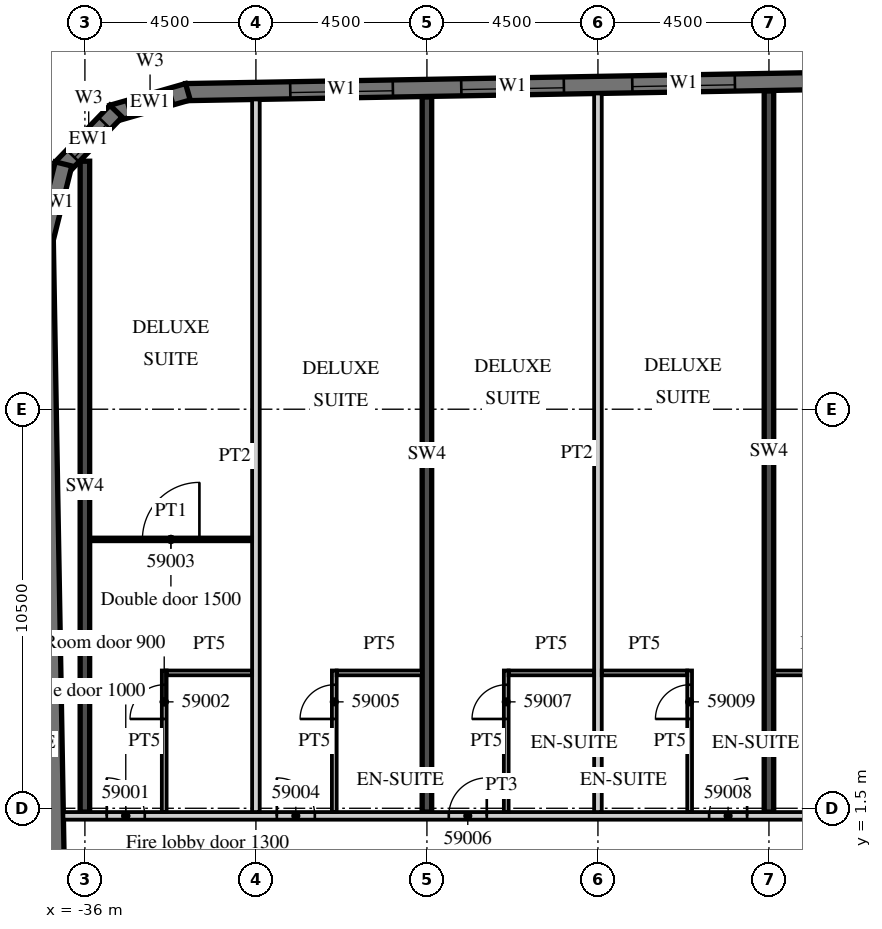
"""IFC4 building model, lengths in metres.
Left out: names, types, materials, properties, quantities, classifications, styles, units other than length and angle.
Written with IfcOpenShell. Run it as: python <this file> out.ifc"""

import sys

from ifc_helpers import new_model, si_unit, direction, frame, frame_2d, origin, place, context, subcontext, project, spatial, polyline, rectangle, outline, extrude, element, fill, save


model = new_model("IFC4")
c1 = context("Model", 3, precision=1e-05, world=origin(), true_north=direction((0.0, 1.0)))
c2 = subcontext(c1, "Body", "Model", "MODEL_VIEW")
j1 = project(units=[si_unit("LENGTHUNIT", "METRE"), si_unit("PLANEANGLEUNIT", "RADIAN")], contexts=[c1])
p1 = place(None, origin())
s1 = spatial("IfcSite", under=j1, at=p1, CompositionType="ELEMENT")
p2 = place(p1, origin())
s2 = spatial("IfcBuilding", under=s1, at=p2, CompositionType="ELEMENT")
p3 = place(p2, frame((0.0, 0.0, 240.8)))
s3 = spatial("IfcBuildingStorey", under=s2, at=p3, CompositionType="ELEMENT", Elevation=240.8)
p4 = place(p3, frame((-36.0, 1.4, 0.0), z_axis=(0.0, 0.0, 1.0), x_axis=(0.0, 1.0, 0.0)))
e1 = element("IfcWall", 1, at=p4, inside=s3, PredefinedType="SHEAR", context=c2, shape_type="SweptSolid", body=[
    extrude(rectangle(XDim=17.125, YDim=0.25, at=frame_2d((8.563, 0.0))), origin(), (0.0, 0.0, 1.0), 3.3),
])
p5 = place(p3, frame((-27.0, 1.4, 0.0), z_axis=(0.0, 0.0, 1.0), x_axis=(0.0, 1.0, 0.0)))
e2 = element("IfcWall", 2, at=p5, inside=s3, PredefinedType="SHEAR", context=c2, shape_type="SweptSolid", body=[
    extrude(rectangle(XDim=18.817, YDim=0.25, at=frame_2d((9.409, 0.0))), origin(), (0.0, 0.0, 1.0), 3.3),
])
p6 = place(p3, frame((-18.0, 1.4, 0.0), z_axis=(0.0, 0.0, 1.0), x_axis=(0.0, 1.0, 0.0)))
e3 = element("IfcWall", 3, at=p6, inside=s3, PredefinedType="SHEAR", context=c2, shape_type="SweptSolid", body=[
    extrude(rectangle(XDim=18.974, YDim=0.25, at=frame_2d((9.487, 0.0))), origin(), (0.0, 0.0, 1.0), 3.3),
])
p7 = place(p3, frame((-37.057, 16.503, 0.0), z_axis=(0.0, 0.0, 1.0), x_axis=(0.017452279857, -0.999847697366, 0.0)))
e4 = element("IfcWall", 4, at=p7, inside=s3, PredefinedType="SOLIDWALL", context=c2, shape_type="SweptSolid", body=[
    extrude(rectangle(XDim=33.0, YDim=0.45, at=frame_2d((16.5, 0.0))), origin(), (0.0, 0.0, 1.0), 3.02),
])
p8 = place(p3, frame((13.504, 21.161, 0.0), z_axis=(0.0, 0.0, 1.0), x_axis=(-0.999847763257, -0.017448504532, 0.0)))
e5 = element("IfcWall", 5, at=p8, inside=s3, PredefinedType="SOLIDWALL", context=c2, shape_type="SweptSolid", body=[
    extrude(rectangle(XDim=46.859, YDim=0.45, at=frame_2d((23.43, 0.0))), origin(), (0.0, 0.0, 1.0), 3.02),
])
p9 = place(p8, frame((0.9, 0.0, 0.45)))
e6 = element("IfcOpeningElement", 6, at=p9, cuts=e5, PredefinedType="OPENING", context=c2, shape_type="SweptSolid", body=[
    extrude(rectangle(XDim=2.7, YDim=2.25, at=frame_2d((1.35, 1.125))), frame((0.0, 0.235, 0.0), z_axis=(0.0, -1.0, 0.0), x_axis=(1.0, 0.0, 0.0)), (0.0, 0.0, 1.0), 0.47),
])
p10 = place(p8, frame((5.401, 0.0, 0.45)))
e7 = element("IfcOpeningElement", 7, at=p10, cuts=e5, PredefinedType="OPENING", context=c2, shape_type="SweptSolid", body=[
    extrude(rectangle(XDim=2.7, YDim=2.25, at=frame_2d((1.35, 1.125))), frame((0.0, 0.235, 0.0), z_axis=(0.0, -1.0, 0.0), x_axis=(1.0, 0.0, 0.0)), (0.0, 0.0, 1.0), 0.47),
])
p11 = place(p8, frame((9.902, 0.0, 0.45)))
e8 = element("IfcOpeningElement", 8, at=p11, cuts=e5, PredefinedType="OPENING", context=c2, shape_type="SweptSolid", body=[
    extrude(rectangle(XDim=2.7, YDim=2.25, at=frame_2d((1.35, 1.125))), frame((0.0, 0.235, 0.0), z_axis=(0.0, -1.0, 0.0), x_axis=(1.0, 0.0, 0.0)), (0.0, 0.0, 1.0), 0.47),
])
p12 = place(p8, frame((14.402, 0.0, 0.45)))
e9 = element("IfcOpeningElement", 9, at=p12, cuts=e5, PredefinedType="OPENING", context=c2, shape_type="SweptSolid", body=[
    extrude(rectangle(XDim=2.7, YDim=2.25, at=frame_2d((1.35, 1.125))), frame((0.0, 0.235, 0.0), z_axis=(0.0, -1.0, 0.0), x_axis=(1.0, 0.0, 0.0)), (0.0, 0.0, 1.0), 0.47),
])
p13 = place(p8, frame((18.903, 0.0, 0.45)))
e10 = element("IfcOpeningElement", 10, at=p13, cuts=e5, PredefinedType="OPENING", context=c2, shape_type="SweptSolid", body=[
    extrude(rectangle(XDim=2.7, YDim=2.25, at=frame_2d((1.35, 1.125))), frame((0.0, 0.235, 0.0), z_axis=(0.0, -1.0, 0.0), x_axis=(1.0, 0.0, 0.0)), (0.0, 0.0, 1.0), 0.47),
])
p14 = place(p8, frame((23.404, 0.0, 0.45)))
e11 = element("IfcOpeningElement", 11, at=p14, cuts=e5, PredefinedType="OPENING", context=c2, shape_type="SweptSolid", body=[
    extrude(rectangle(XDim=2.7, YDim=2.25, at=frame_2d((1.35, 1.125))), frame((0.0, 0.235, 0.0), z_axis=(0.0, -1.0, 0.0), x_axis=(1.0, 0.0, 0.0)), (0.0, 0.0, 1.0), 0.47),
])
p15 = place(p8, frame((27.904, 0.0, 0.45)))
e12 = element("IfcOpeningElement", 12, at=p15, cuts=e5, PredefinedType="OPENING", context=c2, shape_type="SweptSolid", body=[
    extrude(rectangle(XDim=2.7, YDim=2.25, at=frame_2d((1.35, 1.125))), frame((0.0, 0.235, 0.0), z_axis=(0.0, -1.0, 0.0), x_axis=(1.0, 0.0, 0.0)), (0.0, 0.0, 1.0), 0.47),
])
p16 = place(p8, frame((32.405, 0.0, 0.45)))
e13 = element("IfcOpeningElement", 13, at=p16, cuts=e5, PredefinedType="OPENING", context=c2, shape_type="SweptSolid", body=[
    extrude(rectangle(XDim=2.7, YDim=2.25, at=frame_2d((1.35, 1.125))), frame((0.0, 0.235, 0.0), z_axis=(0.0, -1.0, 0.0), x_axis=(1.0, 0.0, 0.0)), (0.0, 0.0, 1.0), 0.47),
])
p17 = place(p8, frame((36.906, 0.0, 0.45)))
e14 = element("IfcOpeningElement", 14, at=p17, cuts=e5, PredefinedType="OPENING", context=c2, shape_type="SweptSolid", body=[
    extrude(rectangle(XDim=2.7, YDim=2.25, at=frame_2d((1.35, 1.125))), frame((0.0, 0.235, 0.0), z_axis=(0.0, -1.0, 0.0), x_axis=(1.0, 0.0, 0.0)), (0.0, 0.0, 1.0), 0.47),
])
p18 = place(p8, frame((41.406, 0.0, 0.45)))
e15 = element("IfcOpeningElement", 15, at=p18, cuts=e5, PredefinedType="OPENING", context=c2, shape_type="SweptSolid", body=[
    extrude(rectangle(XDim=2.7, YDim=2.25, at=frame_2d((1.35, 1.125))), frame((0.0, 0.235, 0.0), z_axis=(0.0, -1.0, 0.0), x_axis=(1.0, 0.0, 0.0)), (0.0, 0.0, 1.0), 0.47),
])
p19 = place(p3, frame((-33.29, 20.352, 0.0), z_axis=(0.0, 0.0, 1.0), x_axis=(-0.961247584925, -0.275686562016, 0.0)))
e16 = element("IfcWall", 16, at=p19, inside=s3, PredefinedType="SOLIDWALL", context=c2, shape_type="SweptSolid", body=[
    extrude(outline(polyline([(0.0, -0.225), (2.071, -0.225), (1.95, 0.225), (0.121, 0.225), (0.0, -0.225)])), origin(), (0.0, 0.0, 1.0), 3.02),
])
p20 = place(p19, frame((0.435, 0.0, 0.45)))
e17 = element("IfcOpeningElement", 17, at=p20, cuts=e16, PredefinedType="OPENING", context=c2, shape_type="SweptSolid", body=[
    extrude(rectangle(XDim=1.2, YDim=2.25, at=frame_2d((0.6, 1.125))), frame((0.0, 0.235, 0.0), z_axis=(0.0, -1.0, 0.0), x_axis=(1.0, 0.0, 0.0)), (0.0, 0.0, 1.0), 0.47),
])
p21 = place(p3, frame((-35.181, 19.842, 0.0), z_axis=(0.0, 0.0, 1.0), x_axis=(-0.694678672846, -0.719320193998, 0.0)))
e18 = element("IfcWall", 18, at=p21, inside=s3, PredefinedType="SOLIDWALL", context=c2, shape_type="SweptSolid", body=[
    extrude(outline(polyline([(0.0, -0.225), (2.071, -0.225), (1.95, 0.225), (0.121, 0.225), (0.0, -0.225)])), origin(), (0.0, 0.0, 1.0), 3.02),
])
p22 = place(p21, frame((0.435, 0.0, 0.45)))
e19 = element("IfcOpeningElement", 19, at=p22, cuts=e18, PredefinedType="OPENING", context=c2, shape_type="SweptSolid", body=[
    extrude(rectangle(XDim=1.2, YDim=2.25, at=frame_2d((0.6, 1.125))), frame((0.0, 0.235, 0.0), z_axis=(0.0, -1.0, 0.0), x_axis=(1.0, 0.0, 0.0)), (0.0, 0.0, 1.0), 0.47),
])
p23 = place(p3, frame((-36.563, 18.454, 0.0), z_axis=(0.0, 0.0, 1.0), x_axis=(-0.241869623482, -0.970308757683, 0.0)))
e20 = element("IfcWall", 20, at=p23, inside=s3, PredefinedType="SOLIDWALL", context=c2, shape_type="SweptSolid", body=[
    extrude(outline(polyline([(-0.0, -0.225), (2.07, -0.225), (1.95, 0.225), (0.12, 0.225), (-0.0, -0.225)])), origin(), (0.0, 0.0, 1.0), 3.02),
])
p24 = place(p3, frame((-36.566, 1.3, 0.0), z_axis=(0.0, 0.0, 1.0), x_axis=(1.0, 0.0, 0.0)))
e21 = element("IfcWall", 21, at=p24, inside=s3, PredefinedType="PARTITIONING", context=c2, shape_type="SweptSolid", body=[
    extrude(rectangle(XDim=23.066, YDim=0.2, at=frame_2d((11.533, 0.0))), origin(), (0.0, 0.0, 1.0), 3.02),
])
p25 = place(p24, frame((1.141, 0.0, 0.0)))
e22 = element("IfcOpeningElement", 22, at=p25, cuts=e21, PredefinedType="OPENING", context=c2, shape_type="SweptSolid", body=[
    extrude(rectangle(XDim=1.0, YDim=2.1, at=frame_2d((0.5, 1.05))), frame((0.0, 0.11, 0.0), z_axis=(0.0, -1.0, 0.0), x_axis=(1.0, 0.0, 0.0)), (0.0, 0.0, 1.0), 0.22),
])
p26 = place(p24, frame((5.616, 0.0, 0.0)))
e23 = element("IfcOpeningElement", 23, at=p26, cuts=e21, PredefinedType="OPENING", context=c2, shape_type="SweptSolid", body=[
    extrude(rectangle(XDim=1.0, YDim=2.1, at=frame_2d((0.5, 1.05))), frame((0.0, 0.11, 0.0), z_axis=(0.0, -1.0, 0.0), x_axis=(1.0, 0.0, 0.0)), (0.0, 0.0, 1.0), 0.22),
])
p27 = place(p24, frame((10.141, 0.0, 0.0)))
e24 = element("IfcOpeningElement", 24, at=p27, cuts=e21, PredefinedType="OPENING", context=c2, shape_type="SweptSolid", body=[
    extrude(rectangle(XDim=1.0, YDim=2.1, at=frame_2d((0.5, 1.05))), frame((0.0, 0.11, 0.0), z_axis=(0.0, -1.0, 0.0), x_axis=(1.0, 0.0, 0.0)), (0.0, 0.0, 1.0), 0.22),
])
p28 = place(p24, frame((16.991, 0.0, 0.0)))
e25 = element("IfcOpeningElement", 25, at=p28, cuts=e21, PredefinedType="OPENING", context=c2, shape_type="SweptSolid", body=[
    extrude(rectangle(XDim=1.0, YDim=2.1, at=frame_2d((0.5, 1.05))), frame((0.0, 0.11, 0.0), z_axis=(0.0, -1.0, 0.0), x_axis=(1.0, 0.0, 0.0)), (0.0, 0.0, 1.0), 0.22),
])
p29 = place(p24, frame((21.491, 0.0, 0.0)))
e26 = element("IfcOpeningElement", 26, at=p29, cuts=e21, PredefinedType="OPENING", context=c2, shape_type="SweptSolid", body=[
    extrude(rectangle(XDim=1.0, YDim=2.1, at=frame_2d((0.5, 1.05))), frame((0.0, 0.11, 0.0), z_axis=(0.0, -1.0, 0.0), x_axis=(1.0, 0.0, 0.0)), (0.0, 0.0, 1.0), 0.22),
])
p30 = place(p3, frame((-31.5, 1.4, 0.0), z_axis=(0.0, 0.0, 1.0), x_axis=(0.0, 1.0, 0.0)))
e27 = element("IfcWall", 27, at=p30, inside=s3, PredefinedType="PARTITIONING", context=c2, shape_type="SweptSolid", body=[
    extrude(rectangle(XDim=18.751, YDim=0.2, at=frame_2d((9.375, 0.0))), origin(), (0.0, 0.0, 1.0), 3.02),
])
p31 = place(p3, frame((-33.913, 1.4, 0.0), z_axis=(0.0, 0.0, 1.0), x_axis=(0.0, 1.0, 0.0)))
e28 = element("IfcWall", 28, at=p31, inside=s3, PredefinedType="PARTITIONING", context=c2, shape_type="SweptSolid", body=[
    extrude(rectangle(XDim=3.725, YDim=0.125, at=frame_2d((1.863, 0.0))), origin(), (0.0, 0.0, 1.0), 3.02),
])
p32 = place(p31, frame((2.45, 0.0, 0.0)))
e29 = element("IfcOpeningElement", 29, at=p32, cuts=e28, PredefinedType="OPENING", context=c2, shape_type="SweptSolid", body=[
    extrude(rectangle(XDim=0.9, YDim=2.1, at=frame_2d((0.45, 1.05))), frame((0.0, 0.073, 0.0), z_axis=(0.0, -1.0, 0.0), x_axis=(1.0, 0.0, 0.0)), (0.0, 0.0, 1.0), 0.145),
])
p33 = place(p3, frame((-33.85, 5.062, 0.0), z_axis=(0.0, 0.0, 1.0), x_axis=(1.0, 0.0, 0.0)))
e30 = element("IfcWall", 30, at=p33, inside=s3, PredefinedType="PARTITIONING", context=c2, shape_type="SweptSolid", body=[
    extrude(rectangle(XDim=2.25, YDim=0.125, at=frame_2d((1.125, 0.0))), origin(), (0.0, 0.0, 1.0), 3.02),
])
p34 = place(p3, frame((-35.875, 8.575, 0.0), z_axis=(0.0, 0.0, 1.0), x_axis=(1.0, 0.0, 0.0)))
e31 = element("IfcWall", 31, at=p34, inside=s3, PredefinedType="PARTITIONING", context=c2, shape_type="SweptSolid", body=[
    extrude(rectangle(XDim=4.275, YDim=0.1, at=frame_2d((2.137, 0.0))), origin(), (0.0, 0.0, 1.0), 3.02),
])
p35 = place(p34, frame((1.388, 0.0, 0.0)))
e32 = element("IfcOpeningElement", 32, at=p35, cuts=e31, PredefinedType="OPENING", context=c2, shape_type="SweptSolid", body=[
    extrude(rectangle(XDim=1.5, YDim=2.1, at=frame_2d((0.75, 1.05))), frame((0.0, 0.06, 0.0), z_axis=(0.0, -1.0, 0.0), x_axis=(1.0, 0.0, 0.0)), (0.0, 0.0, 1.0), 0.12),
])
p36 = place(p3, frame((-29.438, 1.4, 0.0), z_axis=(0.0, 0.0, 1.0), x_axis=(0.0, 1.0, 0.0)))
e33 = element("IfcWall", 33, at=p36, inside=s3, PredefinedType="PARTITIONING", context=c2, shape_type="SweptSolid", body=[
    extrude(rectangle(XDim=3.725, YDim=0.125, at=frame_2d((1.863, 0.0))), origin(), (0.0, 0.0, 1.0), 3.02),
])
p37 = place(p36, frame((2.45, 0.0, 0.0)))
e34 = element("IfcOpeningElement", 34, at=p37, cuts=e33, PredefinedType="OPENING", context=c2, shape_type="SweptSolid", body=[
    extrude(rectangle(XDim=0.9, YDim=2.1, at=frame_2d((0.45, 1.05))), frame((0.0, 0.073, 0.0), z_axis=(0.0, -1.0, 0.0), x_axis=(1.0, 0.0, 0.0)), (0.0, 0.0, 1.0), 0.145),
])
p38 = place(p3, frame((-29.375, 5.062, 0.0), z_axis=(0.0, 0.0, 1.0), x_axis=(1.0, 0.0, 0.0)))
e35 = element("IfcWall", 35, at=p38, inside=s3, PredefinedType="PARTITIONING", context=c2, shape_type="SweptSolid", body=[
    extrude(rectangle(XDim=2.25, YDim=0.125, at=frame_2d((1.125, 0.0))), origin(), (0.0, 0.0, 1.0), 3.02),
])
p39 = place(p3, frame((-22.5, 1.4, 0.0), z_axis=(0.0, 0.0, 1.0), x_axis=(0.0, 1.0, 0.0)))
e36 = element("IfcWall", 36, at=p39, inside=s3, PredefinedType="PARTITIONING", context=c2, shape_type="SweptSolid", body=[
    extrude(rectangle(XDim=18.908, YDim=0.2, at=frame_2d((9.454, 0.0))), origin(), (0.0, 0.0, 1.0), 3.02),
])
p40 = place(p3, frame((-24.913, 1.4, 0.0), z_axis=(0.0, 0.0, 1.0), x_axis=(0.0, 1.0, 0.0)))
e37 = element("IfcWall", 37, at=p40, inside=s3, PredefinedType="PARTITIONING", context=c2, shape_type="SweptSolid", body=[
    extrude(rectangle(XDim=3.725, YDim=0.125, at=frame_2d((1.863, 0.0))), origin(), (0.0, 0.0, 1.0), 3.02),
])
p41 = place(p40, frame((2.45, 0.0, 0.0)))
e38 = element("IfcOpeningElement", 38, at=p41, cuts=e37, PredefinedType="OPENING", context=c2, shape_type="SweptSolid", body=[
    extrude(rectangle(XDim=0.9, YDim=2.1, at=frame_2d((0.45, 1.05))), frame((0.0, 0.073, 0.0), z_axis=(0.0, -1.0, 0.0), x_axis=(1.0, 0.0, 0.0)), (0.0, 0.0, 1.0), 0.145),
])
p42 = place(p3, frame((-24.85, 5.062, 0.0), z_axis=(0.0, 0.0, 1.0), x_axis=(1.0, 0.0, 0.0)))
e39 = element("IfcWall", 39, at=p42, inside=s3, PredefinedType="PARTITIONING", context=c2, shape_type="SweptSolid", body=[
    extrude(rectangle(XDim=2.25, YDim=0.125, at=frame_2d((1.125, 0.0))), origin(), (0.0, 0.0, 1.0), 3.02),
])
p43 = place(p3, frame((-20.087, 1.4, 0.0), z_axis=(0.0, 0.0, 1.0), x_axis=(0.0, 1.0, 0.0)))
e40 = element("IfcWall", 40, at=p43, inside=s3, PredefinedType="PARTITIONING", context=c2, shape_type="SweptSolid", body=[
    extrude(rectangle(XDim=3.725, YDim=0.125, at=frame_2d((1.863, 0.0))), origin(), (0.0, 0.0, 1.0), 3.02),
])
p44 = place(p43, frame((2.45, 0.0, 0.0)))
e41 = element("IfcOpeningElement", 41, at=p44, cuts=e40, PredefinedType="OPENING", context=c2, shape_type="SweptSolid", body=[
    extrude(rectangle(XDim=0.9, YDim=2.1, at=frame_2d((0.45, 1.05))), frame((0.0, 0.073, 0.0), z_axis=(0.0, -1.0, 0.0), x_axis=(1.0, 0.0, 0.0)), (0.0, 0.0, 1.0), 0.145),
])
for number, where, z_axis, x_axis in (
    (42, (-22.4, 5.062, 0.0), (0.0, 0.0, 1.0), (1.0, 0.0, 0.0)),
    (43, (-17.875, 5.062, 0.0), (0.0, 0.0, 1.0), (1.0, 0.0, 0.0)),
):
    element("IfcWall", number, at=place(p3, frame(where, z_axis=z_axis, x_axis=x_axis)), inside=s3, PredefinedType="PARTITIONING", context=c2, shape_type="SweptSolid", body=[
        extrude(rectangle(XDim=2.25, YDim=0.125, at=frame_2d((1.125, 0.0))), origin(), (0.0, 0.0, 1.0), 3.02),
    ])
p45 = place(p16, origin())
e44 = element("IfcWindow", 44, at=p45, inside=s3, PartitioningType="SINGLE_PANEL", PredefinedType="WINDOW", context=c2, shape_type="SweptSolid", body=[
    extrude(rectangle(XDim=2.7, YDim=2.25, at=frame_2d((1.35, 1.125))), frame((0.0, 0.09, 0.0), z_axis=(0.0, -1.0, 0.0), x_axis=(1.0, 0.0, 0.0)), (0.0, 0.0, 1.0), 0.06),
])
fill(e13, e44)
p46 = place(p17, origin())
e45 = element("IfcWindow", 45, at=p46, inside=s3, PartitioningType="SINGLE_PANEL", PredefinedType="WINDOW", context=c2, shape_type="SweptSolid", body=[
    extrude(rectangle(XDim=2.7, YDim=2.25, at=frame_2d((1.35, 1.125))), frame((0.0, 0.09, 0.0), z_axis=(0.0, -1.0, 0.0), x_axis=(1.0, 0.0, 0.0)), (0.0, 0.0, 1.0), 0.06),
])
fill(e14, e45)
p47 = place(p18, origin())
e46 = element("IfcWindow", 46, at=p47, inside=s3, PartitioningType="SINGLE_PANEL", PredefinedType="WINDOW", context=c2, shape_type="SweptSolid", body=[
    extrude(rectangle(XDim=2.7, YDim=2.25, at=frame_2d((1.35, 1.125))), frame((0.0, 0.09, 0.0), z_axis=(0.0, -1.0, 0.0), x_axis=(1.0, 0.0, 0.0)), (0.0, 0.0, 1.0), 0.06),
])
fill(e15, e46)
p48 = place(p20, origin())
e47 = element("IfcWindow", 47, at=p48, inside=s3, PartitioningType="SINGLE_PANEL", PredefinedType="WINDOW", context=c2, shape_type="SweptSolid", body=[
    extrude(rectangle(XDim=1.2, YDim=2.25, at=frame_2d((0.6, 1.125))), frame((0.0, 0.09, 0.0), z_axis=(0.0, -1.0, 0.0), x_axis=(1.0, 0.0, 0.0)), (0.0, 0.0, 1.0), 0.06),
])
fill(e17, e47)
p49 = place(p22, origin())
e48 = element("IfcWindow", 48, at=p49, inside=s3, PartitioningType="SINGLE_PANEL", PredefinedType="WINDOW", context=c2, shape_type="SweptSolid", body=[
    extrude(rectangle(XDim=1.2, YDim=2.25, at=frame_2d((0.6, 1.125))), frame((0.0, 0.09, 0.0), z_axis=(0.0, -1.0, 0.0), x_axis=(1.0, 0.0, 0.0)), (0.0, 0.0, 1.0), 0.06),
])
fill(e19, e48)
p50 = place(p25, origin())
e49 = element("IfcDoor", 49, at=p50, inside=s3, OperationType="SINGLE_SWING_LEFT", PredefinedType="DOOR", context=c2, shape_type="SweptSolid", body=[
    extrude(rectangle(XDim=1.0, YDim=2.1, at=frame_2d((0.5, 1.05))), frame((0.0, 0.025, 0.0), z_axis=(0.0, -1.0, 0.0), x_axis=(1.0, 0.0, 0.0)), (0.0, 0.0, 1.0), 0.05),
])
fill(e22, e49)
p51 = place(p32, origin())
e50 = element("IfcDoor", 50, at=p51, inside=s3, OperationType="SINGLE_SWING_LEFT", PredefinedType="DOOR", context=c2, shape_type="SweptSolid", body=[
    extrude(rectangle(XDim=0.9, YDim=2.1, at=frame_2d((0.45, 1.05))), frame((0.0, 0.025, 0.0), z_axis=(0.0, -1.0, 0.0), x_axis=(1.0, 0.0, 0.0)), (0.0, 0.0, 1.0), 0.05),
])
fill(e29, e50)
p52 = place(p35, origin())
e51 = element("IfcDoor", 51, at=p52, inside=s3, OperationType="SINGLE_SWING_RIGHT", PredefinedType="DOOR", context=c2, shape_type="SweptSolid", body=[
    extrude(rectangle(XDim=1.5, YDim=2.1, at=frame_2d((0.75, 1.05))), frame((0.0, 0.025, 0.0), z_axis=(0.0, -1.0, 0.0), x_axis=(1.0, 0.0, 0.0)), (0.0, 0.0, 1.0), 0.05),
])
fill(e32, e51)
p53 = place(p26, origin())
e52 = element("IfcDoor", 52, at=p53, inside=s3, OperationType="SINGLE_SWING_LEFT", PredefinedType="DOOR", context=c2, shape_type="SweptSolid", body=[
    extrude(rectangle(XDim=1.0, YDim=2.1, at=frame_2d((0.5, 1.05))), frame((0.0, 0.025, 0.0), z_axis=(0.0, -1.0, 0.0), x_axis=(1.0, 0.0, 0.0)), (0.0, 0.0, 1.0), 0.05),
])
fill(e23, e52)
p54 = place(p37, origin())
e53 = element("IfcDoor", 53, at=p54, inside=s3, OperationType="SINGLE_SWING_LEFT", PredefinedType="DOOR", context=c2, shape_type="SweptSolid", body=[
    extrude(rectangle(XDim=0.9, YDim=2.1, at=frame_2d((0.45, 1.05))), frame((0.0, 0.025, 0.0), z_axis=(0.0, -1.0, 0.0), x_axis=(1.0, 0.0, 0.0)), (0.0, 0.0, 1.0), 0.05),
])
fill(e34, e53)
p55 = place(p27, origin())
e54 = element("IfcDoor", 54, at=p55, inside=s3, OperationType="SINGLE_SWING_RIGHT", PredefinedType="DOOR", context=c2, shape_type="SweptSolid", body=[
    extrude(rectangle(XDim=1.0, YDim=2.1, at=frame_2d((0.5, 1.05))), frame((0.0, 0.025, 0.0), z_axis=(0.0, -1.0, 0.0), x_axis=(1.0, 0.0, 0.0)), (0.0, 0.0, 1.0), 0.05),
])
fill(e24, e54)
p56 = place(p41, origin())
e55 = element("IfcDoor", 55, at=p56, inside=s3, OperationType="SINGLE_SWING_LEFT", PredefinedType="DOOR", context=c2, shape_type="SweptSolid", body=[
    extrude(rectangle(XDim=0.9, YDim=2.1, at=frame_2d((0.45, 1.05))), frame((0.0, 0.025, 0.0), z_axis=(0.0, -1.0, 0.0), x_axis=(1.0, 0.0, 0.0)), (0.0, 0.0, 1.0), 0.05),
])
fill(e38, e55)
p57 = place(p28, origin())
e56 = element("IfcDoor", 56, at=p57, inside=s3, OperationType="SINGLE_SWING_RIGHT", PredefinedType="DOOR", context=c2, shape_type="SweptSolid", body=[
    extrude(rectangle(XDim=1.0, YDim=2.1, at=frame_2d((0.5, 1.05))), frame((0.0, 0.025, 0.0), z_axis=(0.0, -1.0, 0.0), x_axis=(1.0, 0.0, 0.0)), (0.0, 0.0, 1.0), 0.05),
])
fill(e25, e56)
p58 = place(p44, origin())
e57 = element("IfcDoor", 57, at=p58, inside=s3, OperationType="SINGLE_SWING_LEFT", PredefinedType="DOOR", context=c2, shape_type="SweptSolid", body=[
    extrude(rectangle(XDim=0.9, YDim=2.1, at=frame_2d((0.45, 1.05))), frame((0.0, 0.025, 0.0), z_axis=(0.0, -1.0, 0.0), x_axis=(1.0, 0.0, 0.0)), (0.0, 0.0, 1.0), 0.05),
])
fill(e41, e57)
save(model, sys.argv[1])
